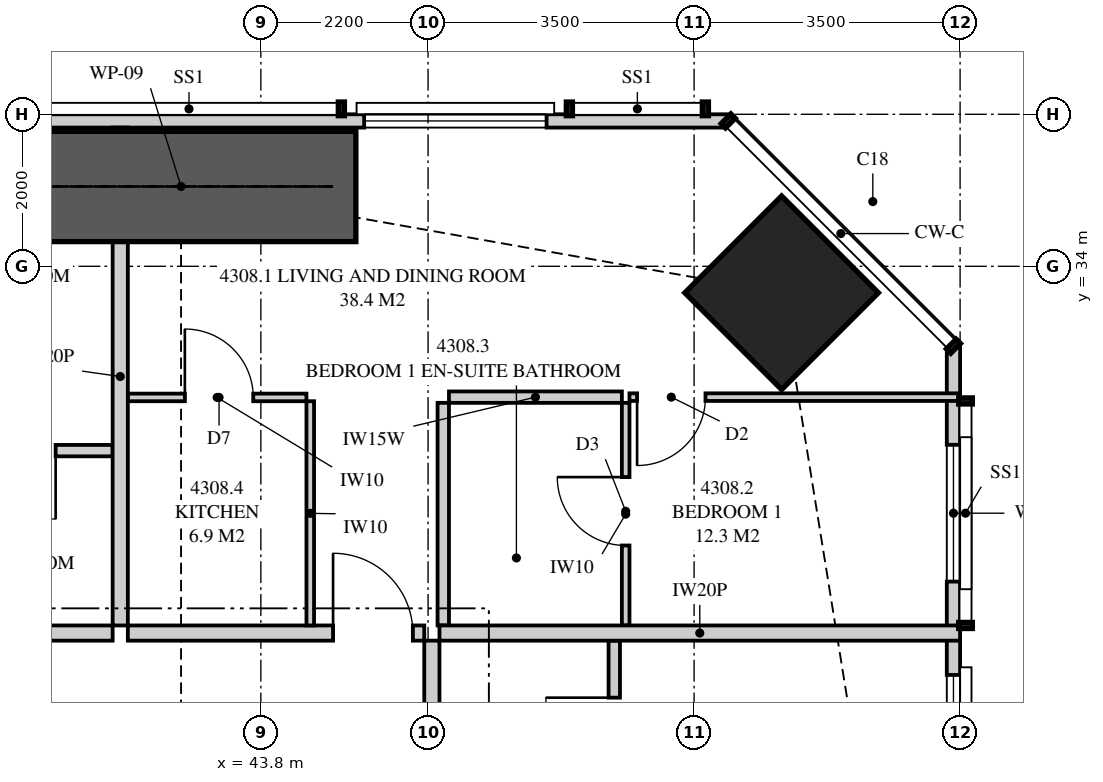
"""IFC4 building model, lengths in metres.
Left out: names, types, materials, properties, quantities, classifications, styles, units other than length and angle.
Written with IfcOpenShell. Run it as: python <this file> out.ifc"""

import sys

from ifc_helpers import new_model, si_unit, direction, frame, frame_2d, origin, origin_2d, place, context, subcontext, project, spatial, polyline, rectangle, outline, extrude, element, fill, save


model = new_model("IFC4")
c1 = context("Model", 3, precision=1e-05, world=origin(), true_north=direction((0.0, 1.0)))
c2 = subcontext(c1, "Body", "Model", "MODEL_VIEW")
j1 = project(units=[si_unit("LENGTHUNIT", "METRE"), si_unit("PLANEANGLEUNIT", "RADIAN")], contexts=[c1])
p1 = place(None, origin())
s1 = spatial("IfcSite", under=j1, at=p1, CompositionType="ELEMENT")
p2 = place(p1, origin())
s2 = spatial("IfcBuilding", under=s1, at=p2, CompositionType="ELEMENT")
p3 = place(p2, frame((0.0, 0.0, 161.05)))
s3 = spatial("IfcBuildingStorey", under=s2, at=p3, CompositionType="ELEMENT", Elevation=161.05)
p4 = place(p3, frame((50.652, 33.652, 0.0), z_axis=(0.0, 0.0, 1.0), x_axis=(0.707106781187, 0.707106781187, 0.0)))
e1 = element("IfcColumn", 1, at=p4, inside=s3, PredefinedType="COLUMN", context=c2, shape_type="SweptSolid", body=[
    extrude(rectangle(XDim=1.8, YDim=1.8, at=origin_2d()), origin(), (0.0, 0.0, 1.0), 3.35),
])
p5 = place(p3, frame((52.913, 3.051, 0.0), z_axis=(0.0, 0.0, 1.0), x_axis=(0.0, 1.0, 0.0)))
e2 = element("IfcWall", 2, at=p5, inside=s3, PredefinedType="SOLIDWALL", context=c2, shape_type="SweptSolid", body=[
    extrude(outline(polyline([(0.0, 0.0), (29.897, 0.0), (29.897, 3.11), (22.167, 3.11), (22.167, 2.15), (22.074, 2.15), (22.074, 3.11), (21.949, 3.11), (21.949, 2.15), (9.949, 2.15), (9.949, 3.11), (9.847, 3.11), (9.847, 2.15), (9.706, 2.15), (9.706, 3.11), (0.0, 3.11), (0.0, 0.0)])), frame((0.0, 0.087, 0.0), z_axis=(0.0, -1.0, 0.0), x_axis=(1.0, 0.0, 0.0)), (0.0, 0.0, 1.0), 0.175),
])
p6 = place(p5, frame((1.797, 0.0, 0.4)))
e3 = element("IfcOpeningElement", 3, at=p6, cuts=e2, PredefinedType="OPENING", context=c2, shape_type="SweptSolid", body=[
    extrude(rectangle(XDim=1.8, YDim=1.7, at=frame_2d((0.9, 0.85))), frame((0.0, 0.097, 0.0), z_axis=(0.0, -1.0, 0.0), x_axis=(1.0, 0.0, 0.0)), (0.0, 0.0, 1.0), 0.195),
])
p7 = place(p5, frame((5.149, 0.0, 0.4)))
e4 = element("IfcOpeningElement", 4, at=p7, cuts=e2, PredefinedType="OPENING", context=c2, shape_type="SweptSolid", body=[
    extrude(rectangle(XDim=2.4, YDim=1.7, at=frame_2d((1.2, 0.85))), frame((0.0, 0.097, 0.0), z_axis=(0.0, -1.0, 0.0), x_axis=(1.0, 0.0, 0.0)), (0.0, 0.0, 1.0), 0.195),
])
p8 = place(p5, frame((15.274, 0.0, 0.0)))
e5 = element("IfcOpeningElement", 5, at=p8, cuts=e2, PredefinedType="OPENING", context=c2, shape_type="SweptSolid", body=[
    extrude(rectangle(XDim=1.8, YDim=2.1, at=frame_2d((0.9, 1.05))), frame((0.0, 0.097, 0.0), z_axis=(0.0, -1.0, 0.0), x_axis=(1.0, 0.0, 0.0)), (0.0, 0.0, 1.0), 0.195),
])
p9 = place(p5, frame((12.349, 0.0, 0.4)))
e6 = element("IfcOpeningElement", 6, at=p9, cuts=e2, PredefinedType="OPENING", context=c2, shape_type="SweptSolid", body=[
    extrude(rectangle(XDim=2.4, YDim=1.7, at=frame_2d((1.2, 0.85))), frame((0.0, 0.097, 0.0), z_axis=(0.0, -1.0, 0.0), x_axis=(1.0, 0.0, 0.0)), (0.0, 0.0, 1.0), 0.195),
])
p10 = place(p5, frame((24.373, 0.0, 0.4)))
e7 = element("IfcOpeningElement", 7, at=p10, cuts=e2, PredefinedType="OPENING", context=c2, shape_type="SweptSolid", body=[
    extrude(rectangle(XDim=1.2, YDim=1.7, at=frame_2d((0.6, 0.85))), frame((0.0, 0.097, 0.0), z_axis=(0.0, -1.0, 0.0), x_axis=(1.0, 0.0, 0.0)), (0.0, 0.0, 1.0), 0.195),
])
p11 = place(p5, frame((26.801, 0.0, 0.4)))
e8 = element("IfcOpeningElement", 8, at=p11, cuts=e2, PredefinedType="OPENING", context=c2, shape_type="SweptSolid", body=[
    extrude(rectangle(XDim=1.8, YDim=1.7, at=frame_2d((0.9, 0.85))), frame((0.0, 0.097, 0.0), z_axis=(0.0, -1.0, 0.0), x_axis=(1.0, 0.0, 0.0)), (0.0, 0.0, 1.0), 0.195),
])
p12 = place(p3, frame((49.949, 35.913, 0.0), z_axis=(0.0, 0.0, 1.0), x_axis=(-1.0, 0.0, 0.0)))
e9 = element("IfcWall", 9, at=p12, inside=s3, PredefinedType="SOLIDWALL", context=c2, shape_type="SweptSolid", body=[
    extrude(outline(polyline([(0.0, 0.0), (34.897, 0.0), (34.897, 3.11), (27.91, 3.11), (27.91, 2.15), (27.836, 2.15), (27.836, 3.11), (27.699, 3.11), (27.699, 2.15), (7.199, 2.15), (7.199, 3.11), (7.062, 3.11), (7.062, 2.15), (6.987, 2.15), (6.987, 3.11), (0.0, 3.11), (0.0, 0.0)])), frame((0.0, 0.087, 0.0), z_axis=(0.0, -1.0, 0.0), x_axis=(1.0, 0.0, 0.0)), (0.0, 0.0, 1.0), 0.175),
])
p13 = place(p12, frame((2.389, 0.0, 0.4)))
e10 = element("IfcOpeningElement", 10, at=p13, cuts=e9, PredefinedType="OPENING", context=c2, shape_type="SweptSolid", body=[
    extrude(rectangle(XDim=2.4, YDim=1.7, at=frame_2d((1.2, 0.85))), frame((0.0, 0.097, 0.0), z_axis=(0.0, -1.0, 0.0), x_axis=(1.0, 0.0, 0.0)), (0.0, 0.0, 1.0), 0.195),
])
p14 = place(p12, frame((10.299, 0.0, 0.0)))
e11 = element("IfcOpeningElement", 11, at=p14, cuts=e9, PredefinedType="OPENING", context=c2, shape_type="SweptSolid", body=[
    extrude(rectangle(XDim=1.8, YDim=2.1, at=frame_2d((0.9, 1.05))), frame((0.0, 0.097, 0.0), z_axis=(0.0, -1.0, 0.0), x_axis=(1.0, 0.0, 0.0)), (0.0, 0.0, 1.0), 0.195),
])
p15 = place(p12, frame((12.649, 0.0, 0.4)))
e12 = element("IfcOpeningElement", 12, at=p15, cuts=e9, PredefinedType="OPENING", context=c2, shape_type="SweptSolid", body=[
    extrude(rectangle(XDim=2.4, YDim=1.7, at=frame_2d((1.2, 0.85))), frame((0.0, 0.097, 0.0), z_axis=(0.0, -1.0, 0.0), x_axis=(1.0, 0.0, 0.0)), (0.0, 0.0, 1.0), 0.195),
])
p16 = place(p12, frame((22.699, 0.0, 0.0)))
e13 = element("IfcOpeningElement", 13, at=p16, cuts=e9, PredefinedType="OPENING", context=c2, shape_type="SweptSolid", body=[
    extrude(rectangle(XDim=1.8, YDim=2.1, at=frame_2d((0.9, 1.05))), frame((0.0, 0.097, 0.0), z_axis=(0.0, -1.0, 0.0), x_axis=(1.0, 0.0, 0.0)), (0.0, 0.0, 1.0), 0.195),
])
p17 = place(p12, frame((19.849, 0.0, 0.4)))
e14 = element("IfcOpeningElement", 14, at=p17, cuts=e9, PredefinedType="OPENING", context=c2, shape_type="SweptSolid", body=[
    extrude(rectangle(XDim=2.4, YDim=1.7, at=frame_2d((1.2, 0.85))), frame((0.0, 0.097, 0.0), z_axis=(0.0, -1.0, 0.0), x_axis=(1.0, 0.0, 0.0)), (0.0, 0.0, 1.0), 0.195),
])
p18 = place(p12, frame((30.973, 0.0, 0.4)))
e15 = element("IfcOpeningElement", 15, at=p18, cuts=e9, PredefinedType="OPENING", context=c2, shape_type="SweptSolid", body=[
    extrude(rectangle(XDim=2.4, YDim=1.7, at=frame_2d((1.2, 0.85))), frame((0.0, 0.097, 0.0), z_axis=(0.0, -1.0, 0.0), x_axis=(1.0, 0.0, 0.0)), (0.0, 0.0, 1.0), 0.195),
])
p19 = place(p3, frame((41.95, 35.825, 0.0), z_axis=(0.0, 0.0, 1.0), x_axis=(0.0, -1.0, 0.0)))
e16 = element("IfcWall", 16, at=p19, inside=s3, PredefinedType="PARTITIONING", context=c2, shape_type="SweptSolid", body=[
    extrude(outline(polyline([(0.529, 2.15), (0.0, 2.15), (0.0, 0.0), (0.529, 0.0), (0.529, 0.876), (1.021, 0.876), (1.021, 0.0), (6.55, 0.0), (6.55, 3.11), (1.685, 3.11), (1.685, 2.15), (1.021, 2.15), (1.021, 1.273), (0.529, 1.273), (0.529, 2.15)])), frame((0.0, 0.1, 0.0), z_axis=(0.0, -1.0, 0.0), x_axis=(1.0, 0.0, 0.0)), (0.0, 0.0, 1.0), 0.2),
])
p20 = place(p3, frame((34.3, 29.175, 0.0), z_axis=(0.0, 0.0, 1.0), x_axis=(1.0, 0.0, 0.0)))
e17 = element("IfcWall", 17, at=p20, inside=s3, PredefinedType="PARTITIONING", context=c2, shape_type="SweptSolid", body=[
    extrude(rectangle(XDim=7.55, YDim=0.2, at=frame_2d((3.775, 0.0))), origin(), (0.0, 0.0, 1.0), 3.11),
])
p21 = place(p20, frame((3.275, 0.0, 0.0)))
e18 = element("IfcOpeningElement", 18, at=p21, cuts=e17, PredefinedType="OPENING", context=c2, shape_type="SweptSolid", body=[
    extrude(rectangle(XDim=1.05, YDim=2.2, at=frame_2d((0.525, 1.1))), frame((0.0, 0.11, 0.0), z_axis=(0.0, -1.0, 0.0), x_axis=(1.0, 0.0, 0.0)), (0.0, 0.0, 1.0), 0.22),
])
p22 = place(p3, frame((39.425, 31.575, 0.0), z_axis=(0.0, 0.0, 1.0), x_axis=(1.0, 0.0, 0.0)))
e19 = element("IfcWall", 19, at=p22, inside=s3, PredefinedType="PLUMBINGWALL", context=c2, shape_type="SweptSolid", body=[
    extrude(rectangle(XDim=2.425, YDim=0.15, at=frame_2d((1.212, 0.0))), origin(), (0.0, 0.0, 1.0), 3.11),
])
p23 = place(p22, frame((0.775, 0.0, 0.0)))
e20 = element("IfcOpeningElement", 20, at=p23, cuts=e19, PredefinedType="OPENING", context=c2, shape_type="SweptSolid", body=[
    extrude(rectangle(XDim=0.9, YDim=2.1, at=frame_2d((0.45, 1.05))), frame((0.0, 0.085, 0.0), z_axis=(0.0, -1.0, 0.0), x_axis=(1.0, 0.0, 0.0)), (0.0, 0.0, 1.0), 0.17),
])
p24 = place(p3, frame((42.05, 29.175, 0.0), z_axis=(0.0, 0.0, 1.0), x_axis=(1.0, 0.0, 0.0)))
e21 = element("IfcWall", 21, at=p24, inside=s3, PredefinedType="PARTITIONING", context=c2, shape_type="SweptSolid", body=[
    extrude(outline(polyline([(0.0, 0.0), (3.9, 0.0), (3.9, 3.11), (1.037, 3.11), (1.037, 2.541), (0.363, 2.541), (0.363, 3.11), (0.0, 3.11), (0.0, 0.0)])), frame((0.0, 0.1, 0.0), z_axis=(0.0, -1.0, 0.0), x_axis=(1.0, 0.0, 0.0)), (0.0, 0.0, 1.0), 0.2),
])
p25 = place(p24, frame((2.7, 0.0, 0.0)))
e22 = element("IfcOpeningElement", 22, at=p25, cuts=e21, PredefinedType="OPENING", context=c2, shape_type="SweptSolid", body=[
    extrude(rectangle(XDim=1.05, YDim=2.2, at=frame_2d((0.525, 1.1))), frame((0.0, 0.11, 0.0), z_axis=(0.0, -1.0, 0.0), x_axis=(1.0, 0.0, 0.0)), (0.0, 0.0, 1.0), 0.22),
])
p26 = place(p3, frame((48.6, 32.204, 0.0), z_axis=(0.0, 0.0, 1.0), x_axis=(0.0, -1.0, 0.0)))
e23 = element("IfcWall", 23, at=p26, inside=s3, PredefinedType="PARTITIONING", context=c2, shape_type="SweptSolid", body=[
    extrude(rectangle(XDim=2.929, YDim=0.1, at=frame_2d((1.464, 0.0))), origin(), (0.0, 0.0, 1.0), 3.11),
])
p27 = place(p26, frame((0.977, 0.0, 0.0)))
e24 = element("IfcOpeningElement", 24, at=p27, cuts=e23, PredefinedType="OPENING", context=c2, shape_type="SweptSolid", body=[
    extrude(rectangle(XDim=0.9, YDim=2.1, at=frame_2d((0.45, 1.05))), frame((0.0, 0.06, 0.0), z_axis=(0.0, -1.0, 0.0), x_axis=(1.0, 0.0, 0.0)), (0.0, 0.0, 1.0), 0.12),
])
p28 = place(p3, frame((48.65, 32.279, 0.0), z_axis=(0.0, 0.0, 1.0), x_axis=(1.0, 0.0, 0.0)))
e25 = element("IfcWall", 25, at=p28, inside=s3, PredefinedType="PARTITIONING", context=c2, shape_type="SweptSolid", body=[
    extrude(outline(polyline([(0.0, 0.0), (4.35, 0.0), (4.35, 3.11), (3.094, 3.11), (3.094, 2.15), (1.352, 2.15), (1.352, 3.11), (0.0, 3.11), (0.0, 0.0)])), frame((0.0, 0.05, 0.0), z_axis=(0.0, -1.0, 0.0), x_axis=(1.0, 0.0, 0.0)), (0.0, 0.0, 1.0), 0.1),
])
p29 = place(p28, frame((0.1, 0.0, 0.0)))
e26 = element("IfcOpeningElement", 26, at=p29, cuts=e25, PredefinedType="OPENING", context=c2, shape_type="SweptSolid", body=[
    extrude(rectangle(XDim=0.9, YDim=2.1, at=frame_2d((0.45, 1.05))), frame((0.0, 0.06, 0.0), z_axis=(0.0, -1.0, 0.0), x_axis=(1.0, 0.0, 0.0)), (0.0, 0.0, 1.0), 0.12),
])
p30 = place(p3, frame((46.275, 32.279, 0.0), z_axis=(0.0, 0.0, 1.0), x_axis=(1.0, 0.0, 0.0)))
e27 = element("IfcWall", 27, at=p30, inside=s3, PredefinedType="PLUMBINGWALL", context=c2, shape_type="SweptSolid", body=[
    extrude(rectangle(XDim=2.275, YDim=0.15, at=frame_2d((1.138, 0.0))), origin(), (0.0, 0.0, 1.0), 3.11),
])
p31 = place(p3, frame((46.2, 32.204, 0.0), z_axis=(0.0, 0.0, 1.0), x_axis=(0.0, -1.0, 0.0)))
e28 = element("IfcWall", 28, at=p31, inside=s3, PredefinedType="PLUMBINGWALL", context=c2, shape_type="SweptSolid", body=[
    extrude(rectangle(XDim=2.929, YDim=0.15, at=frame_2d((1.464, 0.0))), origin(), (0.0, 0.0, 1.0), 3.11),
])
p32 = place(p3, frame((42.05, 32.275, 0.0), z_axis=(0.0, 0.0, 1.0), x_axis=(1.0, 0.0, 0.0)))
e29 = element("IfcWall", 29, at=p32, inside=s3, PredefinedType="PARTITIONING", context=c2, shape_type="SweptSolid", body=[
    extrude(outline(polyline([(0.0, 0.0), (2.35, 0.0), (2.35, 3.11), (0.987, 3.11), (0.987, 2.541), (0.413, 2.541), (0.413, 3.11), (0.0, 3.11), (0.0, 0.0)])), frame((0.0, 0.05, 0.0), z_axis=(0.0, -1.0, 0.0), x_axis=(1.0, 0.0, 0.0)), (0.0, 0.0, 1.0), 0.1),
])
p33 = place(p32, frame((0.75, 0.0, 0.0)))
e30 = element("IfcOpeningElement", 30, at=p33, cuts=e29, PredefinedType="OPENING", context=c2, shape_type="SweptSolid", body=[
    extrude(rectangle(XDim=0.9, YDim=2.1, at=frame_2d((0.45, 1.05))), frame((0.0, 0.06, 0.0), z_axis=(0.0, -1.0, 0.0), x_axis=(1.0, 0.0, 0.0)), (0.0, 0.0, 1.0), 0.12),
])
p34 = place(p3, frame((44.45, 32.225, 0.0), z_axis=(0.0, 0.0, 1.0), x_axis=(0.0, -1.0, 0.0)))
e31 = element("IfcWall", 31, at=p34, inside=s3, PredefinedType="PARTITIONING", context=c2, shape_type="SweptSolid", body=[
    extrude(rectangle(XDim=2.95, YDim=0.1, at=frame_2d((1.475, 0.0))), origin(), (0.0, 0.0, 1.0), 3.11),
])
p35 = place(p3, frame((46.15, 29.175, 0.0), z_axis=(0.0, 0.0, 1.0), x_axis=(1.0, 0.0, 0.0)))
e32 = element("IfcWall", 32, at=p35, inside=s3, PredefinedType="PARTITIONING", context=c2, shape_type="SweptSolid", body=[
    extrude(outline(polyline([(0.0, 0.0), (6.85, 0.0), (6.85, 3.11), (6.147, 3.11), (6.147, 2.15), (4.303, 2.15), (4.303, 3.11), (0.0, 3.11), (0.0, 0.0)])), frame((0.0, 0.1, 0.0), z_axis=(0.0, -1.0, 0.0), x_axis=(1.0, 0.0, 0.0)), (0.0, 0.0, 1.0), 0.2),
])
p36 = place(p3, frame((46.05, 22.9, 0.0), z_axis=(0.0, 0.0, 1.0), x_axis=(0.0, 1.0, 0.0)))
e33 = element("IfcWall", 33, at=p36, inside=s3, PredefinedType="PARTITIONING", context=c2, shape_type="SweptSolid", body=[
    extrude(outline(polyline([(0.0, 0.0), (6.175, 0.0), (6.175, 3.11), (2.437, 3.11), (2.437, 2.541), (1.763, 2.541), (1.763, 3.11), (0.0, 3.11), (0.0, 0.0)])), frame((0.0, 0.1, 0.0), z_axis=(0.0, -1.0, 0.0), x_axis=(1.0, 0.0, 0.0)), (0.0, 0.0, 1.0), 0.2),
])
p37 = place(p36, frame((2.587, 0.0, 0.0)))
e34 = element("IfcOpeningElement", 34, at=p37, cuts=e33, PredefinedType="OPENING", context=c2, shape_type="SweptSolid", body=[
    extrude(rectangle(XDim=1.05, YDim=2.2, at=frame_2d((0.525, 1.1))), frame((0.0, 0.11, 0.0), z_axis=(0.0, -1.0, 0.0), x_axis=(1.0, 0.0, 0.0)), (0.0, 0.0, 1.0), 0.22),
])
p38 = place(p3, frame((48.45, 26.65, 0.0), z_axis=(0.0, 0.0, 1.0), x_axis=(0.0, 1.0, 0.0)))
e35 = element("IfcWall", 35, at=p38, inside=s3, PredefinedType="PLUMBINGWALL", context=c2, shape_type="SweptSolid", body=[
    extrude(rectangle(XDim=2.425, YDim=0.15, at=frame_2d((1.212, 0.0))), origin(), (0.0, 0.0, 1.0), 3.11),
])
p39 = place(p38, frame((0.775, 0.0, 0.0)))
e36 = element("IfcOpeningElement", 36, at=p39, cuts=e35, PredefinedType="OPENING", context=c2, shape_type="SweptSolid", body=[
    extrude(rectangle(XDim=0.9, YDim=2.1, at=frame_2d((0.45, 1.05))), frame((0.0, 0.085, 0.0), z_axis=(0.0, -1.0, 0.0), x_axis=(1.0, 0.0, 0.0)), (0.0, 0.0, 1.0), 0.17),
])
p40 = place(p3, frame((40.45, 35.05, 0.0), z_axis=(0.0, 0.0, 1.0), x_axis=(1.0, 0.0, 0.0)))
e37 = element("IfcWall", 37, at=p40, inside=s3, PredefinedType="SHEAR", context=c2, shape_type="SweptSolid", body=[
    extrude(rectangle(XDim=4.6, YDim=1.45, at=frame_2d((2.3, 0.0))), origin(), (0.0, 0.0, 1.0), 3.35),
])
p41 = place(p10, origin())
e38 = element("IfcWindow", 38, at=p41, inside=s3, PartitioningType="SINGLE_PANEL", PredefinedType="WINDOW", context=c2, shape_type="SweptSolid", body=[
    extrude(rectangle(XDim=1.2, YDim=1.7, at=frame_2d((0.6, 0.85))), frame((0.0, 0.03, 0.0), z_axis=(0.0, -1.0, 0.0), x_axis=(1.0, 0.0, 0.0)), (0.0, 0.0, 1.0), 0.06),
])
fill(e7, e38)
p42 = place(p11, origin())
e39 = element("IfcWindow", 39, at=p42, inside=s3, PartitioningType="SINGLE_PANEL", PredefinedType="WINDOW", context=c2, shape_type="SweptSolid", body=[
    extrude(rectangle(XDim=1.8, YDim=1.7, at=frame_2d((0.9, 0.85))), frame((0.0, 0.03, 0.0), z_axis=(0.0, -1.0, 0.0), x_axis=(1.0, 0.0, 0.0)), (0.0, 0.0, 1.0), 0.06),
])
fill(e8, e39)
p43 = place(p13, origin())
e40 = element("IfcWindow", 40, at=p43, inside=s3, PartitioningType="SINGLE_PANEL", PredefinedType="WINDOW", context=c2, shape_type="SweptSolid", body=[
    extrude(rectangle(XDim=2.4, YDim=1.7, at=frame_2d((1.2, 0.85))), frame((0.0, 0.03, 0.0), z_axis=(0.0, -1.0, 0.0), x_axis=(1.0, 0.0, 0.0)), (0.0, 0.0, 1.0), 0.06),
])
fill(e10, e40)
p44 = place(p23, frame((0.9, 0.0, 0.0), z_axis=(0.0, 0.0, 1.0), x_axis=(-1.0, 0.0, 0.0)))
e41 = element("IfcDoor", 41, at=p44, inside=s3, OperationType="SINGLE_SWING_LEFT", PredefinedType="DOOR", context=c2, shape_type="SweptSolid", body=[
    extrude(rectangle(XDim=0.9, YDim=2.1, at=frame_2d((0.45, 1.05))), frame((0.0, 0.025, 0.0), z_axis=(0.0, -1.0, 0.0), x_axis=(1.0, 0.0, 0.0)), (0.0, 0.0, 1.0), 0.05),
])
fill(e20, e41)
p45 = place(p25, origin())
e42 = element("IfcDoor", 42, at=p45, inside=s3, OperationType="SINGLE_SWING_LEFT", PredefinedType="DOOR", context=c2, shape_type="SweptSolid", body=[
    extrude(rectangle(XDim=1.05, YDim=2.2, at=frame_2d((0.525, 1.1))), frame((0.0, 0.025, 0.0), z_axis=(0.0, -1.0, 0.0), x_axis=(1.0, 0.0, 0.0)), (0.0, 0.0, 1.0), 0.05),
])
fill(e22, e42)
p46 = place(p29, frame((0.9, 0.0, 0.0), z_axis=(0.0, 0.0, 1.0), x_axis=(-1.0, 0.0, 0.0)))
e43 = element("IfcDoor", 43, at=p46, inside=s3, OperationType="SINGLE_SWING_RIGHT", PredefinedType="DOOR", context=c2, shape_type="SweptSolid", body=[
    extrude(rectangle(XDim=0.9, YDim=2.1, at=frame_2d((0.45, 1.05))), frame((0.0, 0.025, 0.0), z_axis=(0.0, -1.0, 0.0), x_axis=(1.0, 0.0, 0.0)), (0.0, 0.0, 1.0), 0.05),
])
fill(e26, e43)
p47 = place(p27, frame((0.9, 0.0, 0.0), z_axis=(0.0, 0.0, 1.0), x_axis=(-1.0, 0.0, 0.0)))
e44 = element("IfcDoor", 44, at=p47, inside=s3, OperationType="SINGLE_SWING_RIGHT", PredefinedType="DOOR", context=c2, shape_type="SweptSolid", body=[
    extrude(rectangle(XDim=0.9, YDim=2.1, at=frame_2d((0.45, 1.05))), frame((0.0, 0.025, 0.0), z_axis=(0.0, -1.0, 0.0), x_axis=(1.0, 0.0, 0.0)), (0.0, 0.0, 1.0), 0.05),
])
fill(e24, e44)
p48 = place(p33, origin())
e45 = element("IfcDoor", 45, at=p48, inside=s3, OperationType="SINGLE_SWING_LEFT", PredefinedType="DOOR", context=c2, shape_type="SweptSolid", body=[
    extrude(rectangle(XDim=0.9, YDim=2.1, at=frame_2d((0.45, 1.05))), frame((0.0, 0.025, 0.0), z_axis=(0.0, -1.0, 0.0), x_axis=(1.0, 0.0, 0.0)), (0.0, 0.0, 1.0), 0.05),
])
fill(e30, e45)
p49 = place(p39, origin())
e46 = element("IfcDoor", 46, at=p49, inside=s3, OperationType="SINGLE_SWING_RIGHT", PredefinedType="DOOR", context=c2, shape_type="SweptSolid", body=[
    extrude(rectangle(XDim=0.9, YDim=2.1, at=frame_2d((0.45, 1.05))), frame((0.0, 0.025, 0.0), z_axis=(0.0, -1.0, 0.0), x_axis=(1.0, 0.0, 0.0)), (0.0, 0.0, 1.0), 0.05),
])
fill(e36, e46)
save(model, sys.argv[1])
